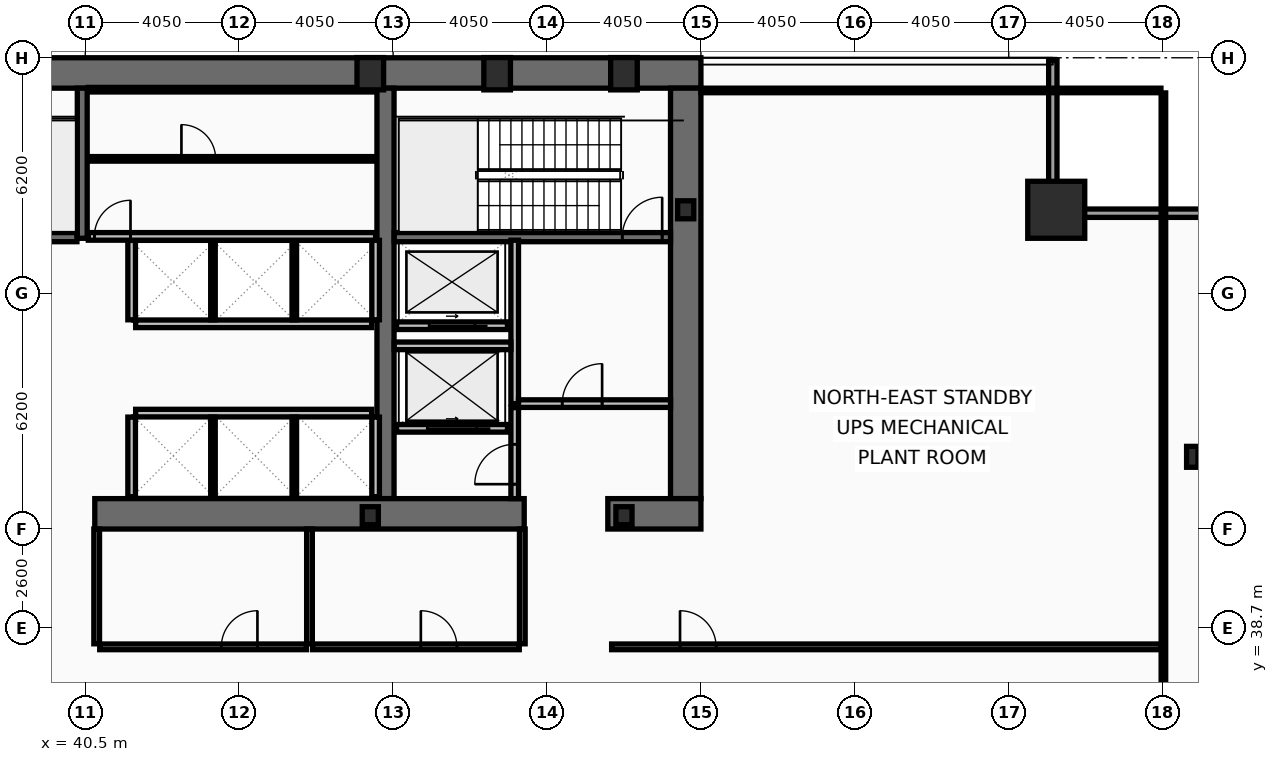
"""IFC4 building model, lengths in metres.
Left out: names, types, materials, properties, quantities, classifications, styles, units other than length and angle.
Written with IfcOpenShell. Run it as: python <this file> out.ifc"""

import sys

from ifc_helpers import new_model, si_unit, direction, frame, frame_2d, origin, origin_2d, place, context, subcontext, project, spatial, rectangle, hollow_rectangle, i_section, extrude, element, fill, save


model = new_model("IFC4")
c1 = context("Model", 3, precision=1e-05, world=origin(), true_north=direction((0.0, 1.0)))
c2 = subcontext(c1, "Body", "Model", "MODEL_VIEW")
j1 = project(units=[si_unit("LENGTHUNIT", "METRE"), si_unit("PLANEANGLEUNIT", "RADIAN")], contexts=[c1])
p1 = place(None, origin())
s1 = spatial("IfcSite", under=j1, at=p1, CompositionType="ELEMENT")
p2 = place(p1, origin())
s2 = spatial("IfcBuilding", under=s1, at=p2, CompositionType="ELEMENT")
p3 = place(p2, frame((0.0, 0.0, 85.8)))
s3 = spatial("IfcBuildingStorey", under=s2, at=p3, CompositionType="ELEMENT", Elevation=85.8)
p4 = place(p3, frame((16.2, 53.3, 0.0), z_axis=(0.0, 0.0, 1.0), x_axis=(1.0, 0.0, 0.0)))
e1 = element("IfcWall", 1, at=p4, inside=s3, PredefinedType="SHEAR", context=c2, shape_type="SweptSolid", body=[
    extrude(rectangle(XDim=40.5, YDim=0.8, at=frame_2d((20.25, 0.0))), origin(), (0.0, 0.0, 1.0), 4.62),
])
p5 = place(p3, frame((56.3, 52.9, 0.0), z_axis=(0.0, 0.0, 1.0), x_axis=(0.0, -1.0, 0.0)))
e2 = element("IfcWall", 2, at=p5, inside=s3, PredefinedType="SHEAR", context=c2, shape_type="SweptSolid", body=[
    extrude(rectangle(XDim=10.8, YDim=0.8, at=frame_2d((5.4, 0.0))), origin(), (0.0, 0.0, 1.0), 4.62),
])
p6 = place(p3, frame((48.4, 42.1, 0.0), z_axis=(0.0, 0.0, 1.0), x_axis=(0.0, 1.0, 0.0)))
e3 = element("IfcWall", 3, at=p6, inside=s3, PredefinedType="SHEAR", context=c2, shape_type="SweptSolid", body=[
    extrude(rectangle(XDim=10.8, YDim=0.45, at=frame_2d((5.4, 0.0))), origin(), (0.0, 0.0, 1.0), 4.62),
])
p7 = place(p3, frame((52.05, 41.7, 0.0), z_axis=(0.0, 0.0, 1.0), x_axis=(-1.0, 0.0, 0.0)))
e4 = element("IfcWall", 4, at=p7, inside=s3, PredefinedType="SHEAR", context=c2, shape_type="SweptSolid", body=[
    extrude(rectangle(XDim=11.3, YDim=0.8, at=frame_2d((5.65, 0.0))), origin(), (0.0, 0.0, 1.0), 4.62),
])
p8 = place(p3, frame((56.7, 41.7, 0.0), z_axis=(0.0, 0.0, 1.0), x_axis=(-1.0, 0.0, 0.0)))
e5 = element("IfcWall", 5, at=p8, inside=s3, PredefinedType="SHEAR", context=c2, shape_type="SweptSolid", body=[
    extrude(rectangle(XDim=2.45, YDim=0.8, at=frame_2d((1.225, 0.0))), origin(), (0.0, 0.0, 1.0), 4.62),
])
p9 = place(p3, frame((40.42, 48.95, 0.0), z_axis=(0.0, 0.0, 1.0), x_axis=(0.0, 1.0, 0.0)))
e6 = element("IfcWall", 6, at=p9, inside=s3, PredefinedType="SHEAR", context=c2, shape_type="SweptSolid", body=[
    extrude(rectangle(XDim=3.95, YDim=0.26, at=frame_2d((1.975, 0.0))), origin(), (0.0, 0.0, 1.0), 4.62),
])
p10 = place(p3, frame((48.63, 48.98, 0.0), z_axis=(0.0, 0.0, 1.0), x_axis=(1.0, 0.0, 0.0)))
e7 = element("IfcWall", 7, at=p10, inside=s3, PredefinedType="SHEAR", context=c2, shape_type="SweptSolid", body=[
    extrude(rectangle(XDim=7.27, YDim=0.24, at=frame_2d((3.635, 0.0))), origin(), (0.0, 0.0, 1.0), 4.62),
])
p11 = place(p10, frame((6.0, 0.0, 0.0)))
e8 = element("IfcOpeningElement", 8, at=p11, cuts=e7, PredefinedType="OPENING", context=c2, shape_type="SweptSolid", body=[
    extrude(rectangle(XDim=1.05, YDim=2.15, at=frame_2d((0.525, 1.075))), frame((0.0, 0.13, 0.0), z_axis=(0.0, -1.0, 0.0), x_axis=(1.0, 0.0, 0.0)), (0.0, 0.0, 1.0), 0.26),
])
p12 = place(p3, frame((32.72, 48.98, 0.0), z_axis=(0.0, 0.0, 1.0), x_axis=(1.0, 0.0, 0.0)))
e9 = element("IfcWall", 9, at=p12, inside=s3, PredefinedType="SHEAR", context=c2, shape_type="SweptSolid", body=[
    extrude(rectangle(XDim=7.56, YDim=0.24, at=frame_2d((3.78, 0.0))), origin(), (0.0, 0.0, 1.0), 4.62),
])
p13 = place(p12, frame((0.22, 0.0, 0.0)))
e10 = element("IfcOpeningElement", 10, at=p13, cuts=e9, PredefinedType="OPENING", context=c2, shape_type="SweptSolid", body=[
    extrude(rectangle(XDim=1.05, YDim=2.15, at=frame_2d((0.525, 1.075))), frame((0.0, 0.13, 0.0), z_axis=(0.0, -1.0, 0.0), x_axis=(1.0, 0.0, 0.0)), (0.0, 0.0, 1.0), 0.26),
])
p14 = place(p3, frame((66.05, 49.7, 0.0), z_axis=(0.0, 0.0, 1.0), x_axis=(1.0, 0.0, 0.0)))
e11 = element("IfcColumn", 11, at=p14, inside=s3, PredefinedType="COLUMN", context=c2, shape_type="SweptSolid", body=[
    extrude(hollow_rectangle(XDim=1.5, YDim=1.5, WallThickness=0.07, at=origin_2d()), origin(), (0.0, 0.0, 1.0), 4.8),
])
for number, where, z_axis, x_axis in (
    (12, (48.0, 53.28, 0.0), (0.0, 0.0, 1.0), (1.0, 0.0, 0.0)),
    (13, (51.337, 53.28, 0.0), (0.0, 0.0, 1.0), (1.0, 0.0, 0.0)),
    (14, (54.675, 53.28, 0.0), (0.0, 0.0, 1.0), (1.0, 0.0, 0.0)),
):
    element("IfcColumn", number, at=place(p3, frame(where, z_axis=z_axis, x_axis=x_axis)), inside=s3, PredefinedType="COLUMN", context=c2, shape_type="SweptSolid", body=[
        extrude(hollow_rectangle(XDim=0.7, YDim=0.85, WallThickness=0.05, at=origin_2d()), origin(), (0.0, 0.0, 1.0), 4.8),
    ])
p15 = place(p3, frame((69.63, 43.2, 0.0), z_axis=(0.0, 0.0, 1.0), x_axis=(1.0, 0.0, 0.0)))
e15 = element("IfcColumn", 15, at=p15, inside=s3, PredefinedType="COLUMN", context=c2, shape_type="SweptSolid", body=[
    extrude(i_section(OverallWidth=0.3, OverallDepth=0.55, WebThickness=0.015, FlangeThickness=0.029, at=origin_2d()), origin(), (0.0, 0.0, 1.0), 4.8),
])
for number, where, z_axis, x_axis in (
    (16, (56.3, 49.7, 0.0), (0.0, 0.0, 1.0), (1.0, 0.0, 0.0)),
    (17, (48.0, 41.65, 0.0), (0.0, 0.0, 1.0), (1.0, 0.0, 0.0)),
    (18, (54.675, 41.65, 0.0), (0.0, 0.0, 1.0), (1.0, 0.0, 0.0)),
):
    element("IfcColumn", number, at=place(p3, frame(where, z_axis=z_axis, x_axis=x_axis)), inside=s3, PredefinedType="COLUMN", context=c2, shape_type="SweptSolid", body=[
        extrude(i_section(OverallWidth=0.424, OverallDepth=0.474, WebThickness=0.048, FlangeThickness=0.077, at=origin_2d()), origin(), (0.0, 0.0, 1.0), 4.8),
    ])
p16 = place(p3, frame((65.96, 53.63, 0.0), z_axis=(0.0, 0.0, 1.0), x_axis=(0.0, -1.0, 0.0)))
e19 = element("IfcWall", 19, at=p16, inside=s3, PredefinedType="SOLIDWALL", context=c2, shape_type="SweptSolid", body=[
    extrude(rectangle(XDim=3.91, YDim=0.22, at=frame_2d((1.955, 0.0))), origin(), (0.0, 0.0, 1.0), 3.96),
])
p17 = place(p3, frame((65.85, 49.61, 0.0), z_axis=(0.0, 0.0, 1.0), x_axis=(1.0, 0.0, 0.0)))
e20 = element("IfcWall", 20, at=p17, inside=s3, PredefinedType="SOLIDWALL", context=c2, shape_type="SweptSolid", body=[
    extrude(rectangle(XDim=4.22, YDim=0.22, at=frame_2d((2.11, 0.0))), origin(), (0.0, 0.0, 1.0), 3.96),
])
p18 = place(p3, frame((51.61, 43.95, 0.0), z_axis=(0.0, 0.0, 1.0), x_axis=(-1.0, 0.0, 0.0)))
e21 = element("IfcWall", 21, at=p18, inside=s3, PredefinedType="PARTITIONING", context=c2, shape_type="SweptSolid", body=[
    extrude(rectangle(XDim=2.92, YDim=0.2, at=frame_2d((1.46, 0.0))), origin(), (0.0, 0.0, 1.0), 4.62),
])
p19 = place(p18, frame((0.81, 0.0, 0.0)))
e22 = element("IfcOpeningElement", 22, at=p19, cuts=e21, PredefinedType="OPENING", context=c2, shape_type="SweptSolid", body=[
    extrude(rectangle(XDim=1.3, YDim=2.18, at=frame_2d((0.65, 1.09))), frame((0.0, 0.11, 0.0), z_axis=(0.0, -1.0, 0.0), x_axis=(1.0, 0.0, 0.0)), (0.0, 0.0, 1.0), 0.22),
])
p20 = place(p3, frame((51.61, 46.65, 0.0), z_axis=(0.0, 0.0, 1.0), x_axis=(-1.0, 0.0, 0.0)))
e23 = element("IfcWall", 23, at=p20, inside=s3, PredefinedType="PARTITIONING", context=c2, shape_type="SweptSolid", body=[
    extrude(rectangle(XDim=2.92, YDim=0.2, at=frame_2d((1.46, 0.0))), origin(), (0.0, 0.0, 1.0), 4.62),
])
p21 = place(p20, frame((0.86, 0.0, 0.0)))
e24 = element("IfcOpeningElement", 24, at=p21, cuts=e23, PredefinedType="OPENING", context=c2, shape_type="SweptSolid", body=[
    extrude(rectangle(XDim=1.2, YDim=2.18, at=frame_2d((0.6, 1.09))), frame((0.0, 0.11, 0.0), z_axis=(0.0, -1.0, 0.0), x_axis=(1.0, 0.0, 0.0)), (0.0, 0.0, 1.0), 0.22),
])
p22 = place(p3, frame((51.8, 44.6, 0.0), z_axis=(0.0, 0.0, 1.0), x_axis=(0.0, 1.0, 0.0)))
e25 = element("IfcWall", 25, at=p22, inside=s3, PredefinedType="PARTITIONING", context=c2, shape_type="SweptSolid", body=[
    extrude(rectangle(XDim=4.3, YDim=0.2, at=frame_2d((2.15, 0.0))), origin(), (0.0, 0.0, 1.0), 4.62),
])
p23 = place(p3, frame((51.9, 44.6, 0.0), z_axis=(0.0, 0.0, 1.0), x_axis=(1.0, 0.0, 0.0)))
e26 = element("IfcWall", 26, at=p23, inside=s3, PredefinedType="PARTITIONING", context=c2, shape_type="SweptSolid", body=[
    extrude(rectangle(XDim=4.0, YDim=0.2, at=frame_2d((2.0, 0.0))), origin(), (0.0, 0.0, 1.0), 4.62),
])
p24 = place(p23, frame((1.15, 0.0, 0.0)))
e27 = element("IfcOpeningElement", 27, at=p24, cuts=e26, PredefinedType="OPENING", context=c2, shape_type="SweptSolid", body=[
    extrude(rectangle(XDim=1.05, YDim=2.15, at=frame_2d((0.525, 1.075))), frame((0.0, 0.11, 0.0), z_axis=(0.0, -1.0, 0.0), x_axis=(1.0, 0.0, 0.0)), (0.0, 0.0, 1.0), 0.22),
])
p25 = place(p3, frame((48.63, 46.12, 0.0), z_axis=(0.0, 0.0, 1.0), x_axis=(1.0, 0.0, 0.0)))
e28 = element("IfcWall", 28, at=p25, inside=s3, PredefinedType="PARTITIONING", context=c2, shape_type="SweptSolid", body=[
    extrude(rectangle(XDim=3.07, YDim=0.2, at=frame_2d((1.535, 0.0))), origin(), (0.0, 0.0, 1.0), 4.62),
])
p26 = place(p3, frame((51.8, 42.1, 0.0), z_axis=(0.0, 0.0, 1.0), x_axis=(0.0, 1.0, 0.0)))
e29 = element("IfcWall", 29, at=p26, inside=s3, PredefinedType="PARTITIONING", context=c2, shape_type="SweptSolid", body=[
    extrude(rectangle(XDim=2.395, YDim=0.2, at=frame_2d((1.198, 0.0))), origin(), (0.0, 0.0, 1.0), 4.62),
])
p27 = place(p26, frame((0.38, 0.0, 0.0)))
e30 = element("IfcOpeningElement", 30, at=p27, cuts=e29, PredefinedType="OPENING", context=c2, shape_type="SweptSolid", body=[
    extrude(rectangle(XDim=1.05, YDim=2.15, at=frame_2d((0.525, 1.075))), frame((0.0, 0.11, 0.0), z_axis=(0.0, -1.0, 0.0), x_axis=(1.0, 0.0, 0.0)), (0.0, 0.0, 1.0), 0.22),
])
p28 = place(p3, frame((41.825, 46.7, 0.0), z_axis=(0.0, 0.0, 1.0), x_axis=(1.0, 0.0, 0.0)))
e31 = element("IfcWall", 31, at=p28, inside=s3, PredefinedType="PARTITIONING", context=c2, shape_type="SweptSolid", body=[
    extrude(rectangle(XDim=6.21, YDim=0.2, at=frame_2d((3.105, 0.0))), origin(), (0.0, 0.0, 1.0), 4.62),
])
for number, where, z_axis, x_axis in (
    (32, (41.72, 46.805, 0.0), (0.0, 0.0, 1.0), (0.0, 1.0, 0.0)),
    (33, (48.14, 46.805, 0.0), (0.0, 0.0, 1.0), (0.0, 1.0, 0.0)),
):
    element("IfcWall", number, at=place(p3, frame(where, z_axis=z_axis, x_axis=x_axis)), inside=s3, PredefinedType="PARTITIONING", context=c2, shape_type="SweptSolid", body=[
        extrude(rectangle(XDim=2.09, YDim=0.2, at=frame_2d((1.045, 0.0))), origin(), (0.0, 0.0, 1.0), 4.62),
    ])
for number, where, z_axis, x_axis in (
    (34, (43.86, 46.805, 0.0), (0.0, 0.0, 1.0), (0.0, 1.0, 0.0)),
    (35, (46.0, 46.805, 0.0), (0.0, 0.0, 1.0), (0.0, 1.0, 0.0)),
):
    element("IfcWall", number, at=place(p3, frame(where, z_axis=z_axis, x_axis=x_axis)), inside=s3, PredefinedType="PARTITIONING", context=c2, shape_type="SweptSolid", body=[
        extrude(rectangle(XDim=2.09, YDim=0.12, at=frame_2d((1.045, 0.0))), origin(), (0.0, 0.0, 1.0), 4.62),
    ])
p29 = place(p3, frame((41.825, 44.35, 0.0), z_axis=(0.0, 0.0, 1.0), x_axis=(1.0, 0.0, 0.0)))
e36 = element("IfcWall", 36, at=p29, inside=s3, PredefinedType="PARTITIONING", context=c2, shape_type="SweptSolid", body=[
    extrude(rectangle(XDim=6.21, YDim=0.2, at=frame_2d((3.105, 0.0))), origin(), (0.0, 0.0, 1.0), 4.62),
])
for number, where, z_axis, x_axis in (
    (37, (41.72, 42.15, 0.0), (0.0, 0.0, 1.0), (0.0, 1.0, 0.0)),
    (38, (48.14, 42.15, 0.0), (0.0, 0.0, 1.0), (0.0, 1.0, 0.0)),
):
    element("IfcWall", number, at=place(p3, frame(where, z_axis=z_axis, x_axis=x_axis)), inside=s3, PredefinedType="PARTITIONING", context=c2, shape_type="SweptSolid", body=[
        extrude(rectangle(XDim=2.095, YDim=0.2, at=frame_2d((1.048, 0.0))), origin(), (0.0, 0.0, 1.0), 4.62),
    ])
for number, where, z_axis, x_axis in (
    (39, (43.86, 42.15, 0.0), (0.0, 0.0, 1.0), (0.0, 1.0, 0.0)),
    (40, (46.0, 42.15, 0.0), (0.0, 0.0, 1.0), (0.0, 1.0, 0.0)),
):
    element("IfcWall", number, at=place(p3, frame(where, z_axis=z_axis, x_axis=x_axis)), inside=s3, PredefinedType="PARTITIONING", context=c2, shape_type="SweptSolid", body=[
        extrude(rectangle(XDim=2.095, YDim=0.12, at=frame_2d((1.048, 0.0))), origin(), (0.0, 0.0, 1.0), 4.62),
    ])
p30 = place(p3, frame((40.58, 52.86, 0.0), z_axis=(0.0, 0.0, 1.0), x_axis=(1.0, 0.0, 0.0)))
e41 = element("IfcWall", 41, at=p30, inside=s3, PredefinedType="PARTITIONING", context=c2, shape_type="SweptSolid", body=[
    extrude(rectangle(XDim=7.56, YDim=0.12, at=frame_2d((3.78, 0.0))), origin(), (0.0, 0.0, 1.0), 4.62),
])
p31 = place(p3, frame((40.58, 49.0, 0.0), z_axis=(0.0, 0.0, 1.0), x_axis=(1.0, 0.0, 0.0)))
e42 = element("IfcWall", 42, at=p31, inside=s3, PredefinedType="PARTITIONING", context=c2, shape_type="SweptSolid", body=[
    extrude(rectangle(XDim=7.56, YDim=0.2, at=frame_2d((3.78, 0.0))), origin(), (0.0, 0.0, 1.0), 4.62),
])
p32 = place(p31, frame((0.16, 0.0, 0.0)))
e43 = element("IfcOpeningElement", 43, at=p32, cuts=e42, PredefinedType="OPENING", context=c2, shape_type="SweptSolid", body=[
    extrude(rectangle(XDim=0.95, YDim=2.1, at=frame_2d((0.475, 1.05))), frame((0.0, 0.11, 0.0), z_axis=(0.0, -1.0, 0.0), x_axis=(1.0, 0.0, 0.0)), (0.0, 0.0, 1.0), 0.22),
])
p33 = place(p3, frame((40.63, 51.04, 0.0), z_axis=(0.0, 0.0, 1.0), x_axis=(1.0, 0.0, 0.0)))
e44 = element("IfcWall", 44, at=p33, inside=s3, PredefinedType="PARTITIONING", context=c2, shape_type="SweptSolid", body=[
    extrude(rectangle(XDim=7.46, YDim=0.12, at=frame_2d((3.73, 0.0))), origin(), (0.0, 0.0, 1.0), 4.62),
])
p34 = place(p33, frame((2.4, 0.0, 0.0)))
e45 = element("IfcOpeningElement", 45, at=p34, cuts=e44, PredefinedType="OPENING", context=c2, shape_type="SweptSolid", body=[
    extrude(rectangle(XDim=0.9, YDim=2.05, at=frame_2d((0.45, 1.025))), frame((0.0, 0.07, 0.0), z_axis=(0.0, -1.0, 0.0), x_axis=(1.0, 0.0, 0.0)), (0.0, 0.0, 1.0), 0.14),
])
p35 = place(p3, frame((40.88, 38.2, 0.0), z_axis=(0.0, 0.0, 1.0), x_axis=(1.0, 0.0, 0.0)))
e46 = element("IfcWall", 46, at=p35, inside=s3, PredefinedType="PARTITIONING", context=c2, shape_type="SweptSolid", body=[
    extrude(rectangle(XDim=5.44, YDim=0.15, at=frame_2d((2.72, 0.0))), origin(), (0.0, 0.0, 1.0), 3.81),
])
p36 = place(p35, frame((3.2, 0.0, 0.0)))
e47 = element("IfcOpeningElement", 47, at=p36, cuts=e46, PredefinedType="OPENING", context=c2, shape_type="SweptSolid", body=[
    extrude(rectangle(XDim=0.95, YDim=2.1, at=frame_2d((0.475, 1.05))), frame((0.0, 0.085, 0.0), z_axis=(0.0, -1.0, 0.0), x_axis=(1.0, 0.0, 0.0)), (0.0, 0.0, 1.0), 0.17),
])
p37 = place(p3, frame((46.48, 38.2, 0.0), z_axis=(0.0, 0.0, 1.0), x_axis=(1.0, 0.0, 0.0)))
e48 = element("IfcWall", 48, at=p37, inside=s3, PredefinedType="PARTITIONING", context=c2, shape_type="SweptSolid", body=[
    extrude(rectangle(XDim=5.44, YDim=0.15, at=frame_2d((2.72, 0.0))), origin(), (0.0, 0.0, 1.0), 3.81),
])
p38 = place(p37, frame((2.85, 0.0, 0.0)))
e49 = element("IfcOpeningElement", 49, at=p38, cuts=e48, PredefinedType="OPENING", context=c2, shape_type="SweptSolid", body=[
    extrude(rectangle(XDim=0.95, YDim=2.1, at=frame_2d((0.475, 1.05))), frame((0.0, 0.085, 0.0), z_axis=(0.0, -1.0, 0.0), x_axis=(1.0, 0.0, 0.0)), (0.0, 0.0, 1.0), 0.17),
])
for number, where, z_axis, x_axis in (
    (50, (40.8, 38.28, 0.0), (0.0, 0.0, 1.0), (0.0, 1.0, 0.0)),
    (51, (46.4, 38.28, 0.0), (0.0, 0.0, 1.0), (0.0, 1.0, 0.0)),
    (52, (52.0, 38.28, 0.0), (0.0, 0.0, 1.0), (0.0, 1.0, 0.0)),
):
    element("IfcWall", number, at=place(p3, frame(where, z_axis=z_axis, x_axis=x_axis)), inside=s3, PredefinedType="PARTITIONING", context=c2, shape_type="SweptSolid", body=[
        extrude(rectangle(XDim=3.02, YDim=0.15, at=frame_2d((1.51, 0.0))), origin(), (0.0, 0.0, 1.0), 4.62),
    ])
p39 = place(p3, frame((54.35, 38.2, 0.0), z_axis=(0.0, 0.0, 1.0), x_axis=(1.0, 0.0, 0.0)))
e53 = element("IfcWall", 53, at=p39, inside=s3, PredefinedType="PARTITIONING", context=c2, shape_type="SweptSolid", body=[
    extrude(rectangle(XDim=14.455, YDim=0.15, at=frame_2d((7.228, 0.0))), origin(), (0.0, 0.0, 1.0), 3.81),
])
p40 = place(p39, frame((1.8, 0.0, 0.0)))
e54 = element("IfcOpeningElement", 54, at=p40, cuts=e53, PredefinedType="OPENING", context=c2, shape_type="SweptSolid", body=[
    extrude(rectangle(XDim=0.95, YDim=2.1, at=frame_2d((0.475, 1.05))), frame((0.0, 0.085, 0.0), z_axis=(0.0, -1.0, 0.0), x_axis=(1.0, 0.0, 0.0)), (0.0, 0.0, 1.0), 0.17),
])
p41 = place(p3, frame((68.87, 10.665, 0.0), z_axis=(0.0, 0.0, 1.0), x_axis=(0.0, 1.0, 0.0)))
e55 = element("IfcWall", 55, at=p41, inside=s3, PredefinedType="PARTITIONING", context=c2, shape_type="SweptSolid", body=[
    extrude(rectangle(XDim=42.11, YDim=0.12, at=frame_2d((21.055, 0.0))), origin(), (0.0, 0.0, 1.0), 3.81),
])
p42 = place(p3, frame((56.7, 52.84, 0.0), z_axis=(0.0, 0.0, 1.0), x_axis=(1.0, 0.0, 0.0)))
e56 = element("IfcWall", 56, at=p42, inside=s3, PredefinedType="PARTITIONING", context=c2, shape_type="SweptSolid", body=[
    extrude(rectangle(XDim=12.105, YDim=0.12, at=frame_2d((6.052, 0.0))), origin(), (0.0, 0.0, 1.0), 4.62),
])
p43 = place(p11, origin())
e57 = element("IfcDoor", 57, at=p43, inside=s3, OperationType="SINGLE_SWING_RIGHT", PredefinedType="DOOR", context=c2, shape_type="SweptSolid", body=[
    extrude(rectangle(XDim=1.05, YDim=2.15, at=frame_2d((0.525, 1.075))), frame((0.0, 0.025, 0.0), z_axis=(0.0, -1.0, 0.0), x_axis=(1.0, 0.0, 0.0)), (0.0, 0.0, 1.0), 0.05),
])
fill(e8, e57)
p44 = place(p19, origin())
e58 = element("IfcDoor", 58, at=p44, inside=s3, OperationType="SLIDING_TO_LEFT", PredefinedType="DOOR", context=c2, shape_type="SweptSolid", body=[
    extrude(rectangle(XDim=1.3, YDim=2.18, at=frame_2d((0.65, 1.09))), frame((0.0, 0.025, 0.0), z_axis=(0.0, -1.0, 0.0), x_axis=(1.0, 0.0, 0.0)), (0.0, 0.0, 1.0), 0.05),
])
fill(e22, e58)
p45 = place(p21, origin())
e59 = element("IfcDoor", 59, at=p45, inside=s3, OperationType="SLIDING_TO_LEFT", PredefinedType="DOOR", context=c2, shape_type="SweptSolid", body=[
    extrude(rectangle(XDim=1.2, YDim=2.18, at=frame_2d((0.6, 1.09))), frame((0.0, 0.025, 0.0), z_axis=(0.0, -1.0, 0.0), x_axis=(1.0, 0.0, 0.0)), (0.0, 0.0, 1.0), 0.05),
])
fill(e24, e59)
p46 = place(p24, origin())
e60 = element("IfcDoor", 60, at=p46, inside=s3, OperationType="SINGLE_SWING_RIGHT", PredefinedType="DOOR", context=c2, shape_type="SweptSolid", body=[
    extrude(rectangle(XDim=1.05, YDim=2.15, at=frame_2d((0.525, 1.075))), frame((0.0, 0.025, 0.0), z_axis=(0.0, -1.0, 0.0), x_axis=(1.0, 0.0, 0.0)), (0.0, 0.0, 1.0), 0.05),
])
fill(e27, e60)
p47 = place(p27, origin())
e61 = element("IfcDoor", 61, at=p47, inside=s3, OperationType="SINGLE_SWING_LEFT", PredefinedType="DOOR", context=c2, shape_type="SweptSolid", body=[
    extrude(rectangle(XDim=1.05, YDim=2.15, at=frame_2d((0.525, 1.075))), frame((0.0, 0.025, 0.0), z_axis=(0.0, -1.0, 0.0), x_axis=(1.0, 0.0, 0.0)), (0.0, 0.0, 1.0), 0.05),
])
fill(e30, e61)
p48 = place(p32, origin())
e62 = element("IfcDoor", 62, at=p48, inside=s3, OperationType="SINGLE_SWING_RIGHT", PredefinedType="DOOR", context=c2, shape_type="SweptSolid", body=[
    extrude(rectangle(XDim=0.95, YDim=2.1, at=frame_2d((0.475, 1.05))), frame((0.0, 0.025, 0.0), z_axis=(0.0, -1.0, 0.0), x_axis=(1.0, 0.0, 0.0)), (0.0, 0.0, 1.0), 0.05),
])
fill(e43, e62)
p49 = place(p34, origin())
e63 = element("IfcDoor", 63, at=p49, inside=s3, OperationType="SINGLE_SWING_LEFT", PredefinedType="DOOR", context=c2, shape_type="SweptSolid", body=[
    extrude(rectangle(XDim=0.9, YDim=2.05, at=frame_2d((0.45, 1.025))), frame((0.0, 0.025, 0.0), z_axis=(0.0, -1.0, 0.0), x_axis=(1.0, 0.0, 0.0)), (0.0, 0.0, 1.0), 0.05),
])
fill(e45, e63)
p50 = place(p36, origin())
e64 = element("IfcDoor", 64, at=p50, inside=s3, OperationType="SINGLE_SWING_RIGHT", PredefinedType="DOOR", context=c2, shape_type="SweptSolid", body=[
    extrude(rectangle(XDim=0.95, YDim=2.1, at=frame_2d((0.475, 1.05))), frame((0.0, 0.025, 0.0), z_axis=(0.0, -1.0, 0.0), x_axis=(1.0, 0.0, 0.0)), (0.0, 0.0, 1.0), 0.05),
])
fill(e47, e64)
p51 = place(p38, origin())
e65 = element("IfcDoor", 65, at=p51, inside=s3, OperationType="SINGLE_SWING_LEFT", PredefinedType="DOOR", context=c2, shape_type="SweptSolid", body=[
    extrude(rectangle(XDim=0.95, YDim=2.1, at=frame_2d((0.475, 1.05))), frame((0.0, 0.025, 0.0), z_axis=(0.0, -1.0, 0.0), x_axis=(1.0, 0.0, 0.0)), (0.0, 0.0, 1.0), 0.05),
])
fill(e49, e65)
p52 = place(p40, origin())
e66 = element("IfcDoor", 66, at=p52, inside=s3, OperationType="SINGLE_SWING_LEFT", PredefinedType="DOOR", context=c2, shape_type="SweptSolid", body=[
    extrude(rectangle(XDim=0.95, YDim=2.1, at=frame_2d((0.475, 1.05))), frame((0.0, 0.025, 0.0), z_axis=(0.0, -1.0, 0.0), x_axis=(1.0, 0.0, 0.0)), (0.0, 0.0, 1.0), 0.05),
])
fill(e54, e66)
save(model, sys.argv[1])
